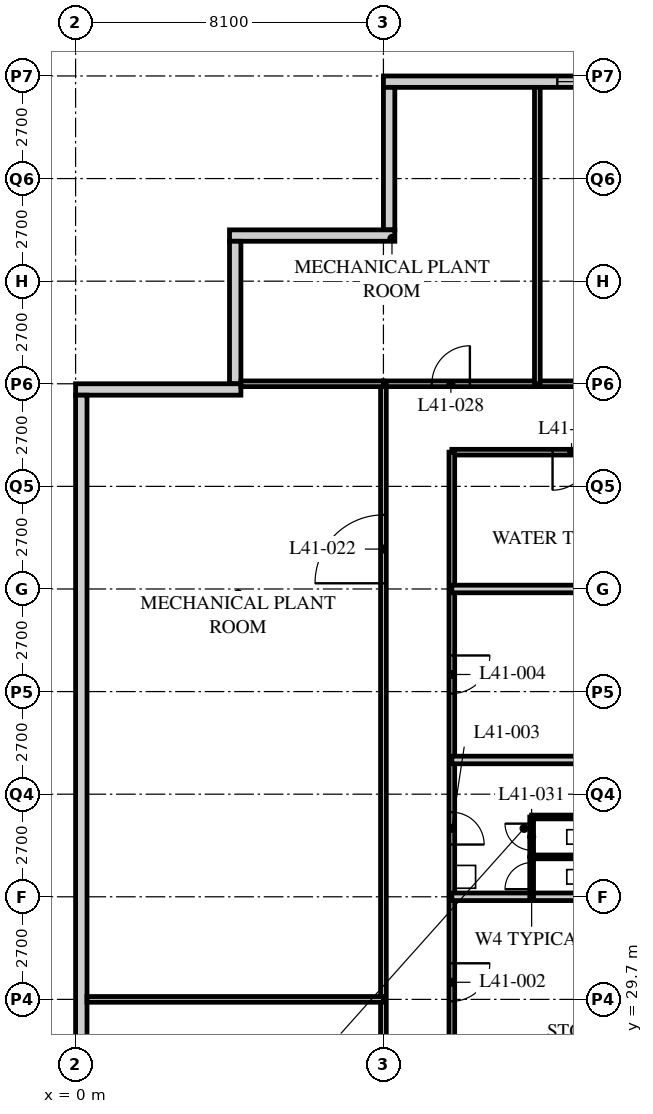
"""IFC4 building model, lengths in metres.
Left out: names, types, materials, properties, quantities, classifications, styles, units other than length and angle.
Written with IfcOpenShell. Run it as: python <this file> out.ifc"""

import sys

from ifc_helpers import new_model, si_unit, direction, frame, frame_2d, origin, place, context, subcontext, project, spatial, rectangle, extrude, element, fill, save


model = new_model("IFC4")
c1 = context("Model", 3, precision=1e-05, world=origin(), true_north=direction((0.0, 1.0)))
c2 = subcontext(c1, "Body", "Model", "MODEL_VIEW")
j1 = project(units=[si_unit("LENGTHUNIT", "METRE"), si_unit("PLANEANGLEUNIT", "RADIAN")], contexts=[c1])
p1 = place(None, origin())
s1 = spatial("IfcSite", under=j1, at=p1, CompositionType="ELEMENT")
p2 = place(p1, origin())
s2 = spatial("IfcBuilding", under=s1, at=p2, CompositionType="ELEMENT")
p3 = place(p2, frame((0.0, 0.0, 157.8)))
s3 = spatial("IfcBuildingStorey", under=s2, at=p3, CompositionType="ELEMENT", Elevation=157.8)
p4 = place(p3, frame((48.3, 53.85, 0.0), z_axis=(0.0, 0.0, 1.0), x_axis=(-1.0, 0.0, 0.0)))
e1 = element("IfcWall", 1, at=p4, inside=s3, PredefinedType="SOLIDWALL", context=c2, shape_type="SweptSolid", body=[
    extrude(rectangle(XDim=40.2, YDim=0.3, at=frame_2d((20.1, 0.0))), origin(), (0.0, 0.0, 1.0), 5.95),
])
p5 = place(p4, frame((4.275, 0.0, 1.0)))
e2 = element("IfcOpeningElement", 2, at=p5, cuts=e1, PredefinedType="OPENING", context=c2, shape_type="SweptSolid", body=[
    extrude(rectangle(XDim=3.0, YDim=1.8, at=frame_2d((1.5, 0.9))), frame((0.0, 0.16, 0.0), z_axis=(0.0, -1.0, 0.0), x_axis=(1.0, 0.0, 0.0)), (0.0, 0.0, 1.0), 0.32),
])
p6 = place(p4, frame((12.375, 0.0, 1.0)))
e3 = element("IfcOpeningElement", 3, at=p6, cuts=e1, PredefinedType="OPENING", context=c2, shape_type="SweptSolid", body=[
    extrude(rectangle(XDim=3.0, YDim=1.8, at=frame_2d((1.5, 0.9))), frame((0.0, 0.16, 0.0), z_axis=(0.0, -1.0, 0.0), x_axis=(1.0, 0.0, 0.0)), (0.0, 0.0, 1.0), 0.32),
])
p7 = place(p4, frame((24.525, 0.0, 1.0)))
e4 = element("IfcOpeningElement", 4, at=p7, cuts=e1, PredefinedType="OPENING", context=c2, shape_type="SweptSolid", body=[
    extrude(rectangle(XDim=3.0, YDim=1.8, at=frame_2d((1.5, 0.9))), frame((0.0, 0.16, 0.0), z_axis=(0.0, -1.0, 0.0), x_axis=(1.0, 0.0, 0.0)), (0.0, 0.0, 1.0), 0.32),
])
p8 = place(p4, frame((32.625, 0.0, 1.0)))
e5 = element("IfcOpeningElement", 5, at=p8, cuts=e1, PredefinedType="OPENING", context=c2, shape_type="SweptSolid", body=[
    extrude(rectangle(XDim=3.0, YDim=1.8, at=frame_2d((1.5, 0.9))), frame((0.0, 0.16, 0.0), z_axis=(0.0, -1.0, 0.0), x_axis=(1.0, 0.0, 0.0)), (0.0, 0.0, 1.0), 0.32),
])
p9 = place(p3, frame((8.25, 53.7, 0.0), z_axis=(0.0, 0.0, 1.0), x_axis=(0.0, -1.0, 0.0)))
e6 = element("IfcWall", 6, at=p9, inside=s3, PredefinedType="SOLIDWALL", context=c2, shape_type="SweptSolid", body=[
    extrude(rectangle(XDim=3.75, YDim=0.3, at=frame_2d((1.875, 0.0))), origin(), (0.0, 0.0, 1.0), 5.95),
])
p10 = place(p3, frame((8.4, 49.8, 0.0), z_axis=(0.0, 0.0, 1.0), x_axis=(-1.0, 0.0, 0.0)))
e7 = element("IfcWall", 7, at=p10, inside=s3, PredefinedType="SOLIDWALL", context=c2, shape_type="SweptSolid", body=[
    extrude(rectangle(XDim=4.35, YDim=0.3, at=frame_2d((2.175, 0.0))), origin(), (0.0, 0.0, 1.0), 6.95),
])
p11 = place(p3, frame((4.2, 49.65, 0.0), z_axis=(0.0, 0.0, 1.0), x_axis=(0.0, -1.0, 0.0)))
e8 = element("IfcWall", 8, at=p11, inside=s3, PredefinedType="SOLIDWALL", context=c2, shape_type="SweptSolid", body=[
    extrude(rectangle(XDim=3.75, YDim=0.3, at=frame_2d((1.875, 0.0))), origin(), (0.0, 0.0, 1.0), 6.95),
])
p12 = place(p3, frame((4.35, 45.75, 0.0), z_axis=(0.0, 0.0, 1.0), x_axis=(-1.0, 0.0, 0.0)))
e9 = element("IfcWall", 9, at=p12, inside=s3, PredefinedType="SOLIDWALL", context=c2, shape_type="SweptSolid", body=[
    extrude(rectangle(XDim=4.35, YDim=0.3, at=frame_2d((2.175, 0.0))), origin(), (0.0, 0.0, 1.0), 5.95),
])
p13 = place(p3, frame((0.15, 45.6, 0.0), z_axis=(0.0, 0.0, 1.0), x_axis=(0.0, -1.0, 0.0)))
e10 = element("IfcWall", 10, at=p13, inside=s3, PredefinedType="SOLIDWALL", context=c2, shape_type="SweptSolid", body=[
    extrude(rectangle(XDim=32.1, YDim=0.3, at=frame_2d((16.05, 0.0))), origin(), (0.0, 0.0, 1.0), 5.95),
])
p14 = place(p3, frame((8.1, 45.9, 0.0), z_axis=(0.0, 0.0, 1.0), x_axis=(1.0, 0.0, 0.0)))
e11 = element("IfcWall", 11, at=p14, inside=s3, PredefinedType="PARTITIONING", context=c2, shape_type="SweptSolid", body=[
    extrude(rectangle(XDim=40.5, YDim=0.15, at=frame_2d((20.25, 0.0))), origin(), (0.0, 0.0, 1.0), 5.95),
])
p15 = place(p14, frame((8.7, 0.0, 0.0)))
e12 = element("IfcOpeningElement", 12, at=p15, cuts=e11, PredefinedType="OPENING", context=c2, shape_type="SweptSolid", body=[
    extrude(rectangle(XDim=1.8, YDim=2.4, at=frame_2d((0.9, 1.2))), frame((0.0, 0.085, 0.0), z_axis=(0.0, -1.0, 0.0), x_axis=(1.0, 0.0, 0.0)), (0.0, 0.0, 1.0), 0.17),
])
p16 = place(p14, frame((19.35, 0.0, 0.0)))
e13 = element("IfcOpeningElement", 13, at=p16, cuts=e11, PredefinedType="OPENING", context=c2, shape_type="SweptSolid", body=[
    extrude(rectangle(XDim=1.8, YDim=2.4, at=frame_2d((0.9, 1.2))), frame((0.0, 0.085, 0.0), z_axis=(0.0, -1.0, 0.0), x_axis=(1.0, 0.0, 0.0)), (0.0, 0.0, 1.0), 0.17),
])
p17 = place(p14, frame((30.0, 0.0, 0.0)))
e14 = element("IfcOpeningElement", 14, at=p17, cuts=e11, PredefinedType="OPENING", context=c2, shape_type="SweptSolid", body=[
    extrude(rectangle(XDim=1.8, YDim=2.4, at=frame_2d((0.9, 1.2))), frame((0.0, 0.085, 0.0), z_axis=(0.0, -1.0, 0.0), x_axis=(1.0, 0.0, 0.0)), (0.0, 0.0, 1.0), 0.17),
])
p18 = place(p14, frame((38.225, 0.0, 0.0)))
e15 = element("IfcOpeningElement", 15, at=p18, cuts=e11, PredefinedType="OPENING", context=c2, shape_type="SweptSolid", body=[
    extrude(rectangle(XDim=1.0, YDim=2.1, at=frame_2d((0.5, 1.05))), frame((0.0, 0.085, 0.0), z_axis=(0.0, -1.0, 0.0), x_axis=(1.0, 0.0, 0.0)), (0.0, 0.0, 1.0), 0.17),
])
p19 = place(p14, frame((1.275, 0.0, 0.0)))
e16 = element("IfcOpeningElement", 16, at=p19, cuts=e11, PredefinedType="OPENING", context=c2, shape_type="SweptSolid", body=[
    extrude(rectangle(XDim=1.0, YDim=2.1, at=frame_2d((0.5, 1.05))), frame((0.0, 0.085, 0.0), z_axis=(0.0, -1.0, 0.0), x_axis=(1.0, 0.0, 0.0)), (0.0, 0.0, 1.0), 0.17),
])
p20 = place(p3, frame((8.1, 13.5, 0.0), z_axis=(0.0, 0.0, 1.0), x_axis=(0.0, 1.0, 0.0)))
e17 = element("IfcWall", 17, at=p20, inside=s3, PredefinedType="PARTITIONING", context=c2, shape_type="SweptSolid", body=[
    extrude(rectangle(XDim=32.4, YDim=0.15, at=frame_2d((16.2, 0.0))), origin(), (0.0, 0.0, 1.0), 5.95),
])
p21 = place(p20, frame((10.95, 0.0, 0.0)))
e18 = element("IfcOpeningElement", 18, at=p21, cuts=e17, PredefinedType="OPENING", context=c2, shape_type="SweptSolid", body=[
    extrude(rectangle(XDim=1.8, YDim=2.4, at=frame_2d((0.9, 1.2))), frame((0.0, 0.085, 0.0), z_axis=(0.0, -1.0, 0.0), x_axis=(1.0, 0.0, 0.0)), (0.0, 0.0, 1.0), 0.17),
])
p22 = place(p20, frame((27.15, 0.0, 0.0)))
e19 = element("IfcOpeningElement", 19, at=p22, cuts=e17, PredefinedType="OPENING", context=c2, shape_type="SweptSolid", body=[
    extrude(rectangle(XDim=1.8, YDim=2.4, at=frame_2d((0.9, 1.2))), frame((0.0, 0.085, 0.0), z_axis=(0.0, -1.0, 0.0), x_axis=(1.0, 0.0, 0.0)), (0.0, 0.0, 1.0), 0.17),
])
p23 = place(p3, frame((27.14, 44.1, 0.0), z_axis=(0.0, 0.0, 1.0), x_axis=(-1.0, 0.0, 0.0)))
e20 = element("IfcWall", 20, at=p23, inside=s3, PredefinedType="PARTITIONING", context=c2, shape_type="SweptSolid", body=[
    extrude(rectangle(XDim=17.24, YDim=0.15, at=frame_2d((8.62, 0.0))), origin(), (0.0, 0.0, 1.0), 6.95),
])
p24 = place(p23, frame((13.59, 0.0, 0.0)))
e21 = element("IfcOpeningElement", 21, at=p24, cuts=e20, PredefinedType="OPENING", context=c2, shape_type="SweptSolid", body=[
    extrude(rectangle(XDim=1.0, YDim=2.1, at=frame_2d((0.5, 1.05))), frame((0.0, 0.085, 0.0), z_axis=(0.0, -1.0, 0.0), x_axis=(1.0, 0.0, 0.0)), (0.0, 0.0, 1.0), 0.17),
])
p25 = place(p23, frame((4.965, 0.0, 0.0)))
e22 = element("IfcOpeningElement", 22, at=p25, cuts=e20, PredefinedType="OPENING", context=c2, shape_type="SweptSolid", body=[
    extrude(rectangle(XDim=1.0, YDim=2.1, at=frame_2d((0.5, 1.05))), frame((0.0, 0.085, 0.0), z_axis=(0.0, -1.0, 0.0), x_axis=(1.0, 0.0, 0.0)), (0.0, 0.0, 1.0), 0.17),
])
p26 = place(p3, frame((9.9, 44.1, 0.0), z_axis=(0.0, 0.0, 1.0), x_axis=(0.0, -1.0, 0.0)))
e23 = element("IfcWall", 23, at=p26, inside=s3, PredefinedType="PARTITIONING", context=c2, shape_type="SweptSolid", body=[
    extrude(rectangle(XDim=28.8, YDim=0.15, at=frame_2d((14.4, 0.0))), origin(), (0.0, 0.0, 1.0), 6.95),
])
p27 = place(p26, frame((17.575, 0.0, 0.0)))
e24 = element("IfcOpeningElement", 24, at=p27, cuts=e23, PredefinedType="OPENING", context=c2, shape_type="SweptSolid", body=[
    extrude(rectangle(XDim=0.85, YDim=2.1, at=frame_2d((0.425, 1.05))), frame((0.0, 0.085, 0.0), z_axis=(0.0, -1.0, 0.0), x_axis=(1.0, 0.0, 0.0)), (0.0, 0.0, 1.0), 0.17),
])
p28 = place(p26, frame((13.45, 0.0, 0.0)))
e25 = element("IfcOpeningElement", 25, at=p28, cuts=e23, PredefinedType="OPENING", context=c2, shape_type="SweptSolid", body=[
    extrude(rectangle(XDim=1.0, YDim=2.1, at=frame_2d((0.5, 1.05))), frame((0.0, 0.085, 0.0), z_axis=(0.0, -1.0, 0.0), x_axis=(1.0, 0.0, 0.0)), (0.0, 0.0, 1.0), 0.17),
])
p29 = place(p26, frame((9.475, 0.0, 0.0)))
e26 = element("IfcOpeningElement", 26, at=p29, cuts=e23, PredefinedType="OPENING", context=c2, shape_type="SweptSolid", body=[
    extrude(rectangle(XDim=0.85, YDim=2.1, at=frame_2d((0.425, 1.05))), frame((0.0, 0.085, 0.0), z_axis=(0.0, -1.0, 0.0), x_axis=(1.0, 0.0, 0.0)), (0.0, 0.0, 1.0), 0.17),
])
p30 = place(p26, frame((5.35, 0.0, 0.0)))
e27 = element("IfcOpeningElement", 27, at=p30, cuts=e23, PredefinedType="OPENING", context=c2, shape_type="SweptSolid", body=[
    extrude(rectangle(XDim=1.0, YDim=2.1, at=frame_2d((0.5, 1.05))), frame((0.0, 0.085, 0.0), z_axis=(0.0, -1.0, 0.0), x_axis=(1.0, 0.0, 0.0)), (0.0, 0.0, 1.0), 0.17),
])
p31 = place(p3, frame((9.9, 32.4, 0.0), z_axis=(0.0, 0.0, 1.0), x_axis=(1.0, 0.0, 0.0)))
e28 = element("IfcWall", 28, at=p31, inside=s3, PredefinedType="SOLIDWALL", context=c2, shape_type="SweptSolid", body=[
    extrude(rectangle(XDim=6.3, YDim=0.2, at=frame_2d((3.15, 0.0))), origin(), (0.0, 0.0, 1.0), 6.95),
])
p32 = place(p3, frame((9.9, 36.0, 0.0), z_axis=(0.0, 0.0, 1.0), x_axis=(1.0, 0.0, 0.0)))
e29 = element("IfcWall", 29, at=p32, inside=s3, PredefinedType="SOLIDWALL", context=c2, shape_type="SweptSolid", body=[
    extrude(rectangle(XDim=3.8, YDim=0.2, at=frame_2d((1.9, 0.0))), origin(), (0.0, 0.0, 1.0), 6.95),
])
p33 = place(p3, frame((9.9, 40.5, 0.0), z_axis=(0.0, 0.0, 1.0), x_axis=(1.0, 0.0, 0.0)))
e30 = element("IfcWall", 30, at=p33, inside=s3, PredefinedType="SOLIDWALL", context=c2, shape_type="SweptSolid", body=[
    extrude(rectangle(XDim=6.3, YDim=0.2, at=frame_2d((3.15, 0.0))), origin(), (0.0, 0.0, 1.0), 6.95),
])
p34 = place(p3, frame((8.1, 29.7, 0.0), z_axis=(0.0, 0.0, 1.0), x_axis=(-1.0, 0.0, 0.0)))
e31 = element("IfcWall", 31, at=p34, inside=s3, PredefinedType="PARTITIONING", context=c2, shape_type="SweptSolid", body=[
    extrude(rectangle(XDim=7.8, YDim=0.15, at=frame_2d((3.9, 0.0))), origin(), (0.0, 0.0, 1.0), 6.95),
])
p35 = place(p3, frame((4.35, 45.9, 0.0), z_axis=(0.0, 0.0, 1.0), x_axis=(1.0, 0.0, 0.0)))
e32 = element("IfcWall", 32, at=p35, inside=s3, PredefinedType="PARTITIONING", context=c2, shape_type="SweptSolid", body=[
    extrude(rectangle(XDim=3.75, YDim=0.15, at=frame_2d((1.875, 0.0))), origin(), (0.0, 0.0, 1.0), 5.95),
])
p36 = place(p3, frame((12.15, 45.9, 0.0), z_axis=(0.0, 0.0, 1.0), x_axis=(0.0, 1.0, 0.0)))
e33 = element("IfcWall", 33, at=p36, inside=s3, PredefinedType="PARTITIONING", context=c2, shape_type="SweptSolid", body=[
    extrude(rectangle(XDim=7.8, YDim=0.15, at=frame_2d((3.9, 0.0))), origin(), (0.0, 0.0, 1.0), 6.95),
])
p37 = place(p3, frame((12.0, 32.4, 0.0), z_axis=(0.0, 0.0, 1.0), x_axis=(0.0, 1.0, 0.0)))
e34 = element("IfcWall", 34, at=p37, inside=s3, PredefinedType="PARTITIONING", context=c2, shape_type="SweptSolid", body=[
    extrude(rectangle(XDim=2.1, YDim=0.1, at=frame_2d((1.05, 0.0))), origin(), (0.0, 0.0, 1.0), 6.95),
])
p38 = place(p37, frame((0.2, 0.0, 0.0)))
e35 = element("IfcOpeningElement", 35, at=p38, cuts=e34, PredefinedType="OPENING", context=c2, shape_type="SweptSolid", body=[
    extrude(rectangle(XDim=0.7, YDim=2.0, at=frame_2d((0.35, 1.0))), frame((0.0, 0.06, 0.0), z_axis=(0.0, -1.0, 0.0), x_axis=(1.0, 0.0, 0.0)), (0.0, 0.0, 1.0), 0.12),
])
p39 = place(p37, frame((1.225, 0.0, 0.0)))
e36 = element("IfcOpeningElement", 36, at=p39, cuts=e34, PredefinedType="OPENING", context=c2, shape_type="SweptSolid", body=[
    extrude(rectangle(XDim=0.7, YDim=2.0, at=frame_2d((0.35, 1.0))), frame((0.0, 0.06, 0.0), z_axis=(0.0, -1.0, 0.0), x_axis=(1.0, 0.0, 0.0)), (0.0, 0.0, 1.0), 0.12),
])
for number, where, z_axis, x_axis in (
    (37, (12.0, 33.45, 0.0), (0.0, 0.0, 1.0), (1.0, 0.0, 0.0)),
    (38, (12.0, 34.5, 0.0), (0.0, 0.0, 1.0), (1.0, 0.0, 0.0)),
):
    element("IfcWall", number, at=place(p3, frame(where, z_axis=z_axis, x_axis=x_axis)), inside=s3, PredefinedType="PARTITIONING", context=c2, shape_type="SweptSolid", body=[
        extrude(rectangle(XDim=1.7, YDim=0.1, at=frame_2d((0.85, 0.0))), origin(), (0.0, 0.0, 1.0), 6.95),
    ])
p40 = place(p8, origin())
e39 = element("IfcWindow", 39, at=p40, inside=s3, PartitioningType="SINGLE_PANEL", PredefinedType="USERDEFINED", context=c2, shape_type="SweptSolid", body=[
    extrude(rectangle(XDim=3.0, YDim=1.8, at=frame_2d((1.5, 0.9))), frame((0.0, 0.075, 0.0), z_axis=(0.0, -1.0, 0.0), x_axis=(1.0, 0.0, 0.0)), (0.0, 0.0, 1.0), 0.15),
])
fill(e5, e39)
p41 = place(p28, origin())
e40 = element("IfcDoor", 40, at=p41, inside=s3, OperationType="SINGLE_SWING_LEFT", PredefinedType="DOOR", context=c2, shape_type="SweptSolid", body=[
    extrude(rectangle(XDim=1.0, YDim=2.1, at=frame_2d((0.5, 1.05))), frame((0.0, 0.025, 0.0), z_axis=(0.0, -1.0, 0.0), x_axis=(1.0, 0.0, 0.0)), (0.0, 0.0, 1.0), 0.05),
])
fill(e25, e40)
p42 = place(p29, origin())
e41 = element("IfcDoor", 41, at=p42, inside=s3, OperationType="SINGLE_SWING_RIGHT", PredefinedType="DOOR", context=c2, shape_type="SweptSolid", body=[
    extrude(rectangle(XDim=0.85, YDim=2.1, at=frame_2d((0.425, 1.05))), frame((0.0, 0.025, 0.0), z_axis=(0.0, -1.0, 0.0), x_axis=(1.0, 0.0, 0.0)), (0.0, 0.0, 1.0), 0.05),
])
fill(e26, e41)
p43 = place(p30, origin())
e42 = element("IfcDoor", 42, at=p43, inside=s3, OperationType="SINGLE_SWING_LEFT", PredefinedType="DOOR", context=c2, shape_type="SweptSolid", body=[
    extrude(rectangle(XDim=1.0, YDim=2.1, at=frame_2d((0.5, 1.05))), frame((0.0, 0.025, 0.0), z_axis=(0.0, -1.0, 0.0), x_axis=(1.0, 0.0, 0.0)), (0.0, 0.0, 1.0), 0.05),
])
fill(e27, e42)
p44 = place(p24, origin())
e43 = element("IfcDoor", 43, at=p44, inside=s3, OperationType="SINGLE_SWING_RIGHT", PredefinedType="DOOR", context=c2, shape_type="SweptSolid", body=[
    extrude(rectangle(XDim=1.0, YDim=2.1, at=frame_2d((0.5, 1.05))), frame((0.0, 0.025, 0.0), z_axis=(0.0, -1.0, 0.0), x_axis=(1.0, 0.0, 0.0)), (0.0, 0.0, 1.0), 0.05),
])
fill(e21, e43)
p45 = place(p22, origin())
e44 = element("IfcDoor", 44, at=p45, inside=s3, OperationType="DOUBLE_DOOR_SINGLE_SWING", PredefinedType="DOOR", context=c2, shape_type="SweptSolid", body=[
    extrude(rectangle(XDim=1.8, YDim=2.4, at=frame_2d((0.9, 1.2))), frame((0.0, 0.025, 0.0), z_axis=(0.0, -1.0, 0.0), x_axis=(1.0, 0.0, 0.0)), (0.0, 0.0, 1.0), 0.05),
])
fill(e19, e44)
p46 = place(p19, origin())
e45 = element("IfcDoor", 45, at=p46, inside=s3, OperationType="SINGLE_SWING_RIGHT", PredefinedType="DOOR", context=c2, shape_type="SweptSolid", body=[
    extrude(rectangle(XDim=1.0, YDim=2.1, at=frame_2d((0.5, 1.05))), frame((0.0, 0.025, 0.0), z_axis=(0.0, -1.0, 0.0), x_axis=(1.0, 0.0, 0.0)), (0.0, 0.0, 1.0), 0.05),
])
fill(e16, e45)
p47 = place(p38, origin())
e46 = element("IfcDoor", 46, at=p47, inside=s3, OperationType="SINGLE_SWING_LEFT", PredefinedType="DOOR", context=c2, shape_type="SweptSolid", body=[
    extrude(rectangle(XDim=0.7, YDim=2.0, at=frame_2d((0.35, 1.0))), frame((0.0, 0.025, 0.0), z_axis=(0.0, -1.0, 0.0), x_axis=(1.0, 0.0, 0.0)), (0.0, 0.0, 1.0), 0.05),
])
fill(e35, e46)
p48 = place(p39, origin())
e47 = element("IfcDoor", 47, at=p48, inside=s3, OperationType="SINGLE_SWING_RIGHT", PredefinedType="DOOR", context=c2, shape_type="SweptSolid", body=[
    extrude(rectangle(XDim=0.7, YDim=2.0, at=frame_2d((0.35, 1.0))), frame((0.0, 0.025, 0.0), z_axis=(0.0, -1.0, 0.0), x_axis=(1.0, 0.0, 0.0)), (0.0, 0.0, 1.0), 0.05),
])
fill(e36, e47)
save(model, sys.argv[1])
